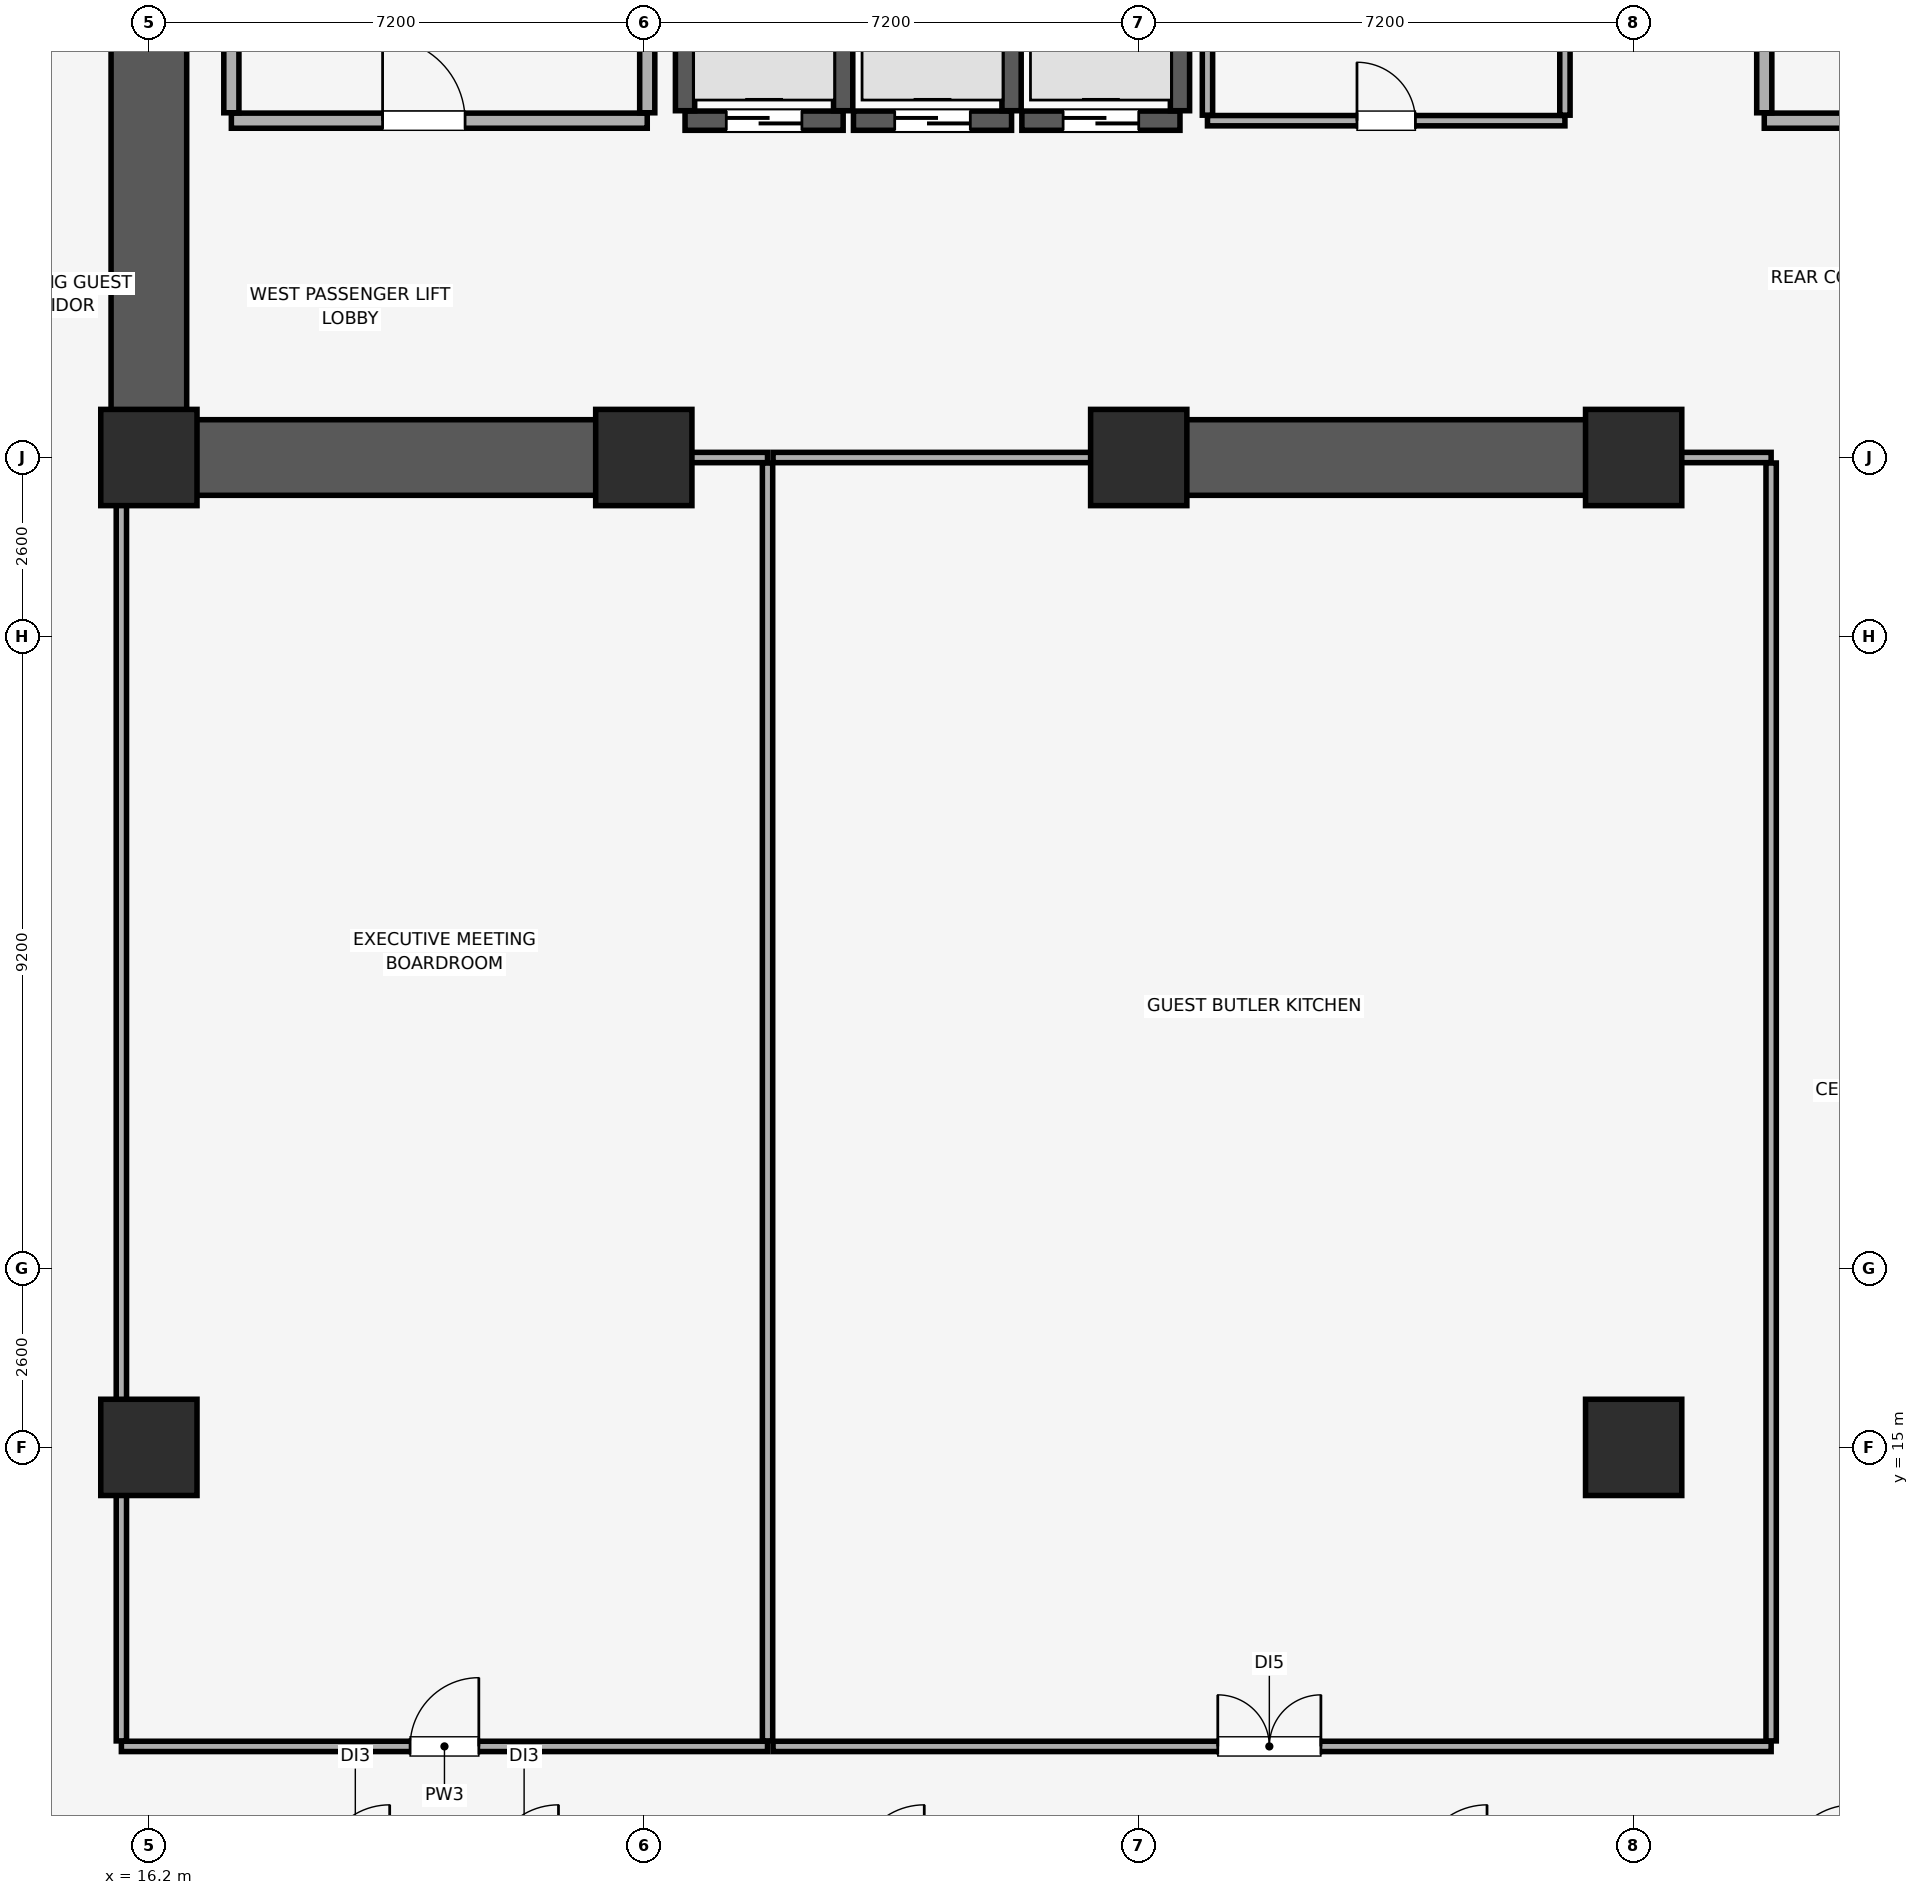
"""IFC4 building model, lengths in metres.
Left out: names, types, materials, properties, quantities, classifications, styles, units other than length and angle.
Written with IfcOpenShell. Run it as: python <this file> out.ifc"""

import sys

from ifc_helpers import new_model, si_unit, direction, frame, frame_2d, origin, origin_2d, place, context, subcontext, project, spatial, rectangle, extrude, element, fill, save


model = new_model("IFC4")
c1 = context("Model", 3, precision=1e-05, world=origin(), true_north=direction((0.0, 1.0)))
c2 = subcontext(c1, "Body", "Model", "MODEL_VIEW")
j1 = project(units=[si_unit("LENGTHUNIT", "METRE"), si_unit("PLANEANGLEUNIT", "RADIAN")], contexts=[c1])
p1 = place(None, origin())
s1 = spatial("IfcSite", under=j1, at=p1, CompositionType="ELEMENT")
p2 = place(p1, origin())
s2 = spatial("IfcBuilding", under=s1, at=p2, CompositionType="ELEMENT")
p3 = place(p2, frame((0.0, 0.0, 35.15)))
s3 = spatial("IfcBuildingStorey", under=s2, at=p3, CompositionType="ELEMENT", Elevation=35.15)
for number, where, z_axis, x_axis in (
    (1, (16.2, 15.0, 0.0), (0.0, 0.0, 1.0), (1.0, 0.0, 0.0)),
    (2, (37.8, 15.0, 0.0), (0.0, 0.0, 1.0), (1.0, 0.0, 0.0)),
    (3, (16.2, 29.4, 0.0), (0.0, 0.0, 1.0), (1.0, 0.0, 0.0)),
    (4, (23.4, 29.4, 0.0), (0.0, 0.0, 1.0), (1.0, 0.0, 0.0)),
    (5, (30.6, 29.4, 0.0), (0.0, 0.0, 1.0), (1.0, 0.0, 0.0)),
    (6, (37.8, 29.4, 0.0), (0.0, 0.0, 1.0), (1.0, 0.0, 0.0)),
):
    element("IfcColumn", number, at=place(p3, frame(where, z_axis=z_axis, x_axis=x_axis)), inside=s3, PredefinedType="COLUMN", context=c2, shape_type="SweptSolid", body=[
        extrude(rectangle(XDim=1.4, YDim=1.4, at=origin_2d()), origin(), (0.0, 0.0, 1.0), 3.51),
    ])
p4 = place(p3, frame((16.2, 29.4, 0.0), z_axis=(0.0, 0.0, 1.0), x_axis=(0.0, 1.0, 0.0)))
e7 = element("IfcWall", 7, at=p4, inside=s3, PredefinedType="SHEAR", context=c2, shape_type="SweptSolid", body=[
    extrude(rectangle(XDim=19.2, YDim=1.1, at=frame_2d((9.6, 0.0))), origin(), (0.0, 0.0, 1.0), 3.51),
])
p5 = place(p3, frame((16.755, 29.4, 0.0), z_axis=(0.0, 0.0, 1.0), x_axis=(1.0, 0.0, 0.0)))
e8 = element("IfcWall", 8, at=p5, inside=s3, PredefinedType="SHEAR", context=c2, shape_type="SweptSolid", body=[
    extrude(rectangle(XDim=6.845, YDim=1.1, at=frame_2d((3.423, 0.0))), origin(), (0.0, 0.0, 1.0), 3.51),
])
p6 = place(p3, frame((30.4, 29.4, 0.0), z_axis=(0.0, 0.0, 1.0), x_axis=(1.0, 0.0, 0.0)))
e9 = element("IfcWall", 9, at=p6, inside=s3, PredefinedType="SHEAR", context=c2, shape_type="SweptSolid", body=[
    extrude(rectangle(XDim=7.6, YDim=1.1, at=frame_2d((3.8, 0.0))), origin(), (0.0, 0.0, 1.0), 3.51),
])
p7 = place(p3, frame((24.0, 34.3, 0.0), z_axis=(0.0, 0.0, 1.0), x_axis=(1.0, 0.0, 0.0)))
e10 = element("IfcWall", 10, at=p7, inside=s3, PredefinedType="SHEAR", context=c2, shape_type="SweptSolid", body=[
    extrude(rectangle(XDim=2.3, YDim=0.28, at=frame_2d((1.15, 0.0))), origin(), (0.0, 0.0, 1.0), 3.51),
])
p8 = place(p7, frame((0.6, 0.0, 0.0)))
e11 = element("IfcOpeningElement", 11, at=p8, cuts=e10, PredefinedType="OPENING", context=c2, shape_type="SweptSolid", body=[
    extrude(rectangle(XDim=1.1, YDim=2.2, at=frame_2d((0.55, 1.1))), frame((0.0, 0.15, 0.0), z_axis=(0.0, -1.0, 0.0), x_axis=(1.0, 0.0, 0.0)), (0.0, 0.0, 1.0), 0.3),
])
for number, where, z_axis, x_axis in (
    (12, (24.0, 34.445, 0.0), (0.0, 0.0, 1.0), (0.0, 1.0, 0.0)),
    (13, (26.3, 34.445, 0.0), (0.0, 0.0, 1.0), (0.0, 1.0, 0.0)),
):
    element("IfcWall", number, at=place(p3, frame(where, z_axis=z_axis, x_axis=x_axis)), inside=s3, PredefinedType="SHEAR", context=c2, shape_type="SweptSolid", body=[
        extrude(rectangle(XDim=2.01, YDim=0.28, at=frame_2d((1.005, 0.0))), origin(), (0.0, 0.0, 1.0), 3.51),
    ])
p9 = place(p3, frame((26.45, 34.3, 0.0), z_axis=(0.0, 0.0, 1.0), x_axis=(1.0, 0.0, 0.0)))
e14 = element("IfcWall", 14, at=p9, inside=s3, PredefinedType="SHEAR", context=c2, shape_type="SweptSolid", body=[
    extrude(rectangle(XDim=2.3, YDim=0.28, at=frame_2d((1.15, 0.0))), origin(), (0.0, 0.0, 1.0), 3.51),
])
p10 = place(p9, frame((0.6, 0.0, 0.0)))
e15 = element("IfcOpeningElement", 15, at=p10, cuts=e14, PredefinedType="OPENING", context=c2, shape_type="SweptSolid", body=[
    extrude(rectangle(XDim=1.1, YDim=2.2, at=frame_2d((0.55, 1.1))), frame((0.0, 0.15, 0.0), z_axis=(0.0, -1.0, 0.0), x_axis=(1.0, 0.0, 0.0)), (0.0, 0.0, 1.0), 0.3),
])
p11 = place(p3, frame((28.75, 34.445, 0.0), z_axis=(0.0, 0.0, 1.0), x_axis=(0.0, 1.0, 0.0)))
e16 = element("IfcWall", 16, at=p11, inside=s3, PredefinedType="SHEAR", context=c2, shape_type="SweptSolid", body=[
    extrude(rectangle(XDim=2.01, YDim=0.28, at=frame_2d((1.005, 0.0))), origin(), (0.0, 0.0, 1.0), 3.51),
])
p12 = place(p3, frame((28.9, 34.3, 0.0), z_axis=(0.0, 0.0, 1.0), x_axis=(1.0, 0.0, 0.0)))
e17 = element("IfcWall", 17, at=p12, inside=s3, PredefinedType="SHEAR", context=c2, shape_type="SweptSolid", body=[
    extrude(rectangle(XDim=2.3, YDim=0.28, at=frame_2d((1.15, 0.0))), origin(), (0.0, 0.0, 1.0), 3.51),
])
p13 = place(p12, frame((0.6, 0.0, 0.0)))
e18 = element("IfcOpeningElement", 18, at=p13, cuts=e17, PredefinedType="OPENING", context=c2, shape_type="SweptSolid", body=[
    extrude(rectangle(XDim=1.1, YDim=2.2, at=frame_2d((0.55, 1.1))), frame((0.0, 0.15, 0.0), z_axis=(0.0, -1.0, 0.0), x_axis=(1.0, 0.0, 0.0)), (0.0, 0.0, 1.0), 0.3),
])
p14 = place(p3, frame((31.2, 34.445, 0.0), z_axis=(0.0, 0.0, 1.0), x_axis=(0.0, 1.0, 0.0)))
e19 = element("IfcWall", 19, at=p14, inside=s3, PredefinedType="SHEAR", context=c2, shape_type="SweptSolid", body=[
    extrude(rectangle(XDim=2.01, YDim=0.28, at=frame_2d((1.005, 0.0))), origin(), (0.0, 0.0, 1.0), 3.51),
])
p15 = place(p3, frame((17.4, 34.3, 0.0), z_axis=(0.0, 0.0, 1.0), x_axis=(1.0, 0.0, 0.0)))
e20 = element("IfcWall", 20, at=p15, inside=s3, PredefinedType="PARTITIONING", context=c2, shape_type="SweptSolid", body=[
    extrude(rectangle(XDim=6.05, YDim=0.22, at=frame_2d((3.025, 0.0))), origin(), (0.0, 0.0, 1.0), 3.51),
])
p16 = place(p15, frame((2.2, 0.0, 0.0)))
e21 = element("IfcOpeningElement", 21, at=p16, cuts=e20, PredefinedType="OPENING", context=c2, shape_type="SweptSolid", body=[
    extrude(rectangle(XDim=1.2, YDim=2.15, at=frame_2d((0.6, 1.075))), frame((0.0, 0.12, 0.0), z_axis=(0.0, -1.0, 0.0), x_axis=(1.0, 0.0, 0.0)), (0.0, 0.0, 1.0), 0.24),
])
p17 = place(p3, frame((17.4, 34.415, 0.0), z_axis=(0.0, 0.0, 1.0), x_axis=(0.0, 1.0, 0.0)))
e22 = element("IfcWall", 22, at=p17, inside=s3, PredefinedType="PARTITIONING", context=c2, shape_type="SweptSolid", body=[
    extrude(rectangle(XDim=5.43, YDim=0.22, at=frame_2d((2.715, 0.0))), origin(), (0.0, 0.0, 1.0), 3.51),
])
p18 = place(p3, frame((23.45, 34.415, 0.0), z_axis=(0.0, 0.0, 1.0), x_axis=(0.0, 1.0, 0.0)))
e23 = element("IfcWall", 23, at=p18, inside=s3, PredefinedType="PARTITIONING", context=c2, shape_type="SweptSolid", body=[
    extrude(rectangle(XDim=5.64, YDim=0.22, at=frame_2d((2.82, 0.0))), origin(), (0.0, 0.0, 1.0), 3.51),
])
p19 = place(p3, frame((39.7, 34.3, 0.0), z_axis=(0.0, 0.0, 1.0), x_axis=(1.0, 0.0, 0.0)))
e24 = element("IfcWall", 24, at=p19, inside=s3, PredefinedType="PARTITIONING", context=c2, shape_type="SweptSolid", body=[
    extrude(rectangle(XDim=4.6, YDim=0.22, at=frame_2d((2.3, 0.0))), origin(), (0.0, 0.0, 1.0), 3.51),
])
p20 = place(p19, frame((1.7, 0.0, 0.0)))
e25 = element("IfcOpeningElement", 25, at=p20, cuts=e24, PredefinedType="OPENING", context=c2, shape_type="SweptSolid", body=[
    extrude(rectangle(XDim=1.2, YDim=2.15, at=frame_2d((0.6, 1.075))), frame((0.0, 0.12, 0.0), z_axis=(0.0, -1.0, 0.0), x_axis=(1.0, 0.0, 0.0)), (0.0, 0.0, 1.0), 0.24),
])
p21 = place(p3, frame((39.7, 34.415, 0.0), z_axis=(0.0, 0.0, 1.0), x_axis=(0.0, 1.0, 0.0)))
e26 = element("IfcWall", 26, at=p21, inside=s3, PredefinedType="PARTITIONING", context=c2, shape_type="SweptSolid", body=[
    extrude(rectangle(XDim=5.785, YDim=0.22, at=frame_2d((2.893, 0.0))), origin(), (0.0, 0.0, 1.0), 3.51),
])
p22 = place(p3, frame((31.6, 34.3, 0.0), z_axis=(0.0, 0.0, 1.0), x_axis=(1.0, 0.0, 0.0)))
e27 = element("IfcWall", 27, at=p22, inside=s3, PredefinedType="PARTITIONING", context=c2, shape_type="SweptSolid", body=[
    extrude(rectangle(XDim=5.2, YDim=0.15, at=frame_2d((2.6, 0.0))), origin(), (0.0, 0.0, 1.0), 3.51),
])
p23 = place(p22, frame((2.175, 0.0, 0.0)))
e28 = element("IfcOpeningElement", 28, at=p23, cuts=e27, PredefinedType="OPENING", context=c2, shape_type="SweptSolid", body=[
    extrude(rectangle(XDim=0.85, YDim=2.1, at=frame_2d((0.425, 1.05))), frame((0.0, 0.085, 0.0), z_axis=(0.0, -1.0, 0.0), x_axis=(1.0, 0.0, 0.0)), (0.0, 0.0, 1.0), 0.17),
])
for number, where, z_axis, x_axis in (
    (29, (31.6, 34.38, 0.0), (0.0, 0.0, 1.0), (0.0, 1.0, 0.0)),
    (30, (36.8, 34.38, 0.0), (0.0, 0.0, 1.0), (0.0, 1.0, 0.0)),
):
    element("IfcWall", number, at=place(p3, frame(where, z_axis=z_axis, x_axis=x_axis)), inside=s3, PredefinedType="PARTITIONING", context=c2, shape_type="SweptSolid", body=[
        extrude(rectangle(XDim=4.94, YDim=0.15, at=frame_2d((2.47, 0.0))), origin(), (0.0, 0.0, 1.0), 3.51),
    ])
p24 = place(p3, frame((15.8, 10.65, 0.0), z_axis=(0.0, 0.0, 1.0), x_axis=(1.0, 0.0, 0.0)))
e31 = element("IfcWall", 31, at=p24, inside=s3, PredefinedType="PARTITIONING", context=c2, shape_type="SweptSolid", body=[
    extrude(rectangle(XDim=9.4, YDim=0.15, at=frame_2d((4.7, 0.0))), origin(), (0.0, 0.0, 1.0), 3.51),
])
p25 = place(p24, frame((4.2, 0.0, 0.0)))
e32 = element("IfcOpeningElement", 32, at=p25, cuts=e31, PredefinedType="OPENING", context=c2, shape_type="SweptSolid", body=[
    extrude(rectangle(XDim=1.0, YDim=2.15, at=frame_2d((0.5, 1.075))), frame((0.0, 0.085, 0.0), z_axis=(0.0, -1.0, 0.0), x_axis=(1.0, 0.0, 0.0)), (0.0, 0.0, 1.0), 0.17),
])
p26 = place(p3, frame((23.61, 29.4, 0.0), z_axis=(0.0, 0.0, 1.0), x_axis=(1.0, 0.0, 0.0)))
e33 = element("IfcWall", 33, at=p26, inside=s3, PredefinedType="PARTITIONING", context=c2, shape_type="SweptSolid", body=[
    extrude(rectangle(XDim=1.59, YDim=0.15, at=frame_2d((0.795, 0.0))), origin(), (0.0, 0.0, 1.0), 2.41),
])
p27 = place(p3, frame((15.8, 10.73, 0.0), z_axis=(0.0, 0.0, 1.0), x_axis=(0.0, 1.0, 0.0)))
e34 = element("IfcWall", 34, at=p27, inside=s3, PredefinedType="PARTITIONING", context=c2, shape_type="SweptSolid", body=[
    extrude(rectangle(XDim=18.66, YDim=0.15, at=frame_2d((9.33, 0.0))), origin(), (0.0, 0.0, 1.0), 3.51),
])
p28 = place(p3, frame((25.2, 10.73, 0.0), z_axis=(0.0, 0.0, 1.0), x_axis=(0.0, 1.0, 0.0)))
e35 = element("IfcWall", 35, at=p28, inside=s3, PredefinedType="PARTITIONING", context=c2, shape_type="SweptSolid", body=[
    extrude(rectangle(XDim=18.59, YDim=0.15, at=frame_2d((9.295, 0.0))), origin(), (0.0, 0.0, 1.0), 3.51),
])
p29 = place(p3, frame((25.28, 10.65, 0.0), z_axis=(0.0, 0.0, 1.0), x_axis=(1.0, 0.0, 0.0)))
e36 = element("IfcWall", 36, at=p29, inside=s3, PredefinedType="PARTITIONING", context=c2, shape_type="SweptSolid", body=[
    extrude(rectangle(XDim=14.52, YDim=0.15, at=frame_2d((7.26, 0.0))), origin(), (0.0, 0.0, 1.0), 3.51),
])
p30 = place(p29, frame((6.47, 0.0, 0.0)))
e37 = element("IfcOpeningElement", 37, at=p30, cuts=e36, PredefinedType="OPENING", context=c2, shape_type="SweptSolid", body=[
    extrude(rectangle(XDim=1.5, YDim=2.25, at=frame_2d((0.75, 1.125))), frame((0.0, 0.085, 0.0), z_axis=(0.0, -1.0, 0.0), x_axis=(1.0, 0.0, 0.0)), (0.0, 0.0, 1.0), 0.17),
])
p31 = place(p3, frame((25.28, 29.4, 0.0), z_axis=(0.0, 0.0, 1.0), x_axis=(1.0, 0.0, 0.0)))
e38 = element("IfcWall", 38, at=p31, inside=s3, PredefinedType="PARTITIONING", context=c2, shape_type="SweptSolid", body=[
    extrude(rectangle(XDim=5.11, YDim=0.15, at=frame_2d((2.555, 0.0))), origin(), (0.0, 0.0, 1.0), 2.41),
])
p32 = place(p3, frame((38.01, 29.4, 0.0), z_axis=(0.0, 0.0, 1.0), x_axis=(1.0, 0.0, 0.0)))
e39 = element("IfcWall", 39, at=p32, inside=s3, PredefinedType="PARTITIONING", context=c2, shape_type="SweptSolid", body=[
    extrude(rectangle(XDim=1.79, YDim=0.15, at=frame_2d((0.895, 0.0))), origin(), (0.0, 0.0, 1.0), 2.41),
])
p33 = place(p3, frame((39.8, 10.73, 0.0), z_axis=(0.0, 0.0, 1.0), x_axis=(0.0, 1.0, 0.0)))
e40 = element("IfcWall", 40, at=p33, inside=s3, PredefinedType="PARTITIONING", context=c2, shape_type="SweptSolid", body=[
    extrude(rectangle(XDim=18.59, YDim=0.15, at=frame_2d((9.295, 0.0))), origin(), (0.0, 0.0, 1.0), 3.51),
])
p34 = place(p8, origin())
e41 = element("IfcDoor", 41, at=p34, inside=s3, OperationType="DOUBLE_DOOR_SLIDING", PredefinedType="DOOR", context=c2, shape_type="SweptSolid", body=[
    extrude(rectangle(XDim=1.1, YDim=2.2, at=frame_2d((0.55, 1.1))), frame((0.0, 0.025, 0.0), z_axis=(0.0, -1.0, 0.0), x_axis=(1.0, 0.0, 0.0)), (0.0, 0.0, 1.0), 0.05),
])
fill(e11, e41)
p35 = place(p10, origin())
e42 = element("IfcDoor", 42, at=p35, inside=s3, OperationType="DOUBLE_DOOR_SLIDING", PredefinedType="DOOR", context=c2, shape_type="SweptSolid", body=[
    extrude(rectangle(XDim=1.1, YDim=2.2, at=frame_2d((0.55, 1.1))), frame((0.0, 0.025, 0.0), z_axis=(0.0, -1.0, 0.0), x_axis=(1.0, 0.0, 0.0)), (0.0, 0.0, 1.0), 0.05),
])
fill(e15, e42)
p36 = place(p13, origin())
e43 = element("IfcDoor", 43, at=p36, inside=s3, OperationType="DOUBLE_DOOR_SLIDING", PredefinedType="DOOR", context=c2, shape_type="SweptSolid", body=[
    extrude(rectangle(XDim=1.1, YDim=2.2, at=frame_2d((0.55, 1.1))), frame((0.0, 0.025, 0.0), z_axis=(0.0, -1.0, 0.0), x_axis=(1.0, 0.0, 0.0)), (0.0, 0.0, 1.0), 0.05),
])
fill(e18, e43)
p37 = place(p16, origin())
e44 = element("IfcDoor", 44, at=p37, inside=s3, OperationType="SINGLE_SWING_LEFT", PredefinedType="DOOR", context=c2, shape_type="SweptSolid", body=[
    extrude(rectangle(XDim=1.2, YDim=2.15, at=frame_2d((0.6, 1.075))), frame((0.0, 0.025, 0.0), z_axis=(0.0, -1.0, 0.0), x_axis=(1.0, 0.0, 0.0)), (0.0, 0.0, 1.0), 0.05),
])
fill(e21, e44)
p38 = place(p23, origin())
e45 = element("IfcDoor", 45, at=p38, inside=s3, OperationType="SINGLE_SWING_LEFT", PredefinedType="DOOR", context=c2, shape_type="SweptSolid", body=[
    extrude(rectangle(XDim=0.85, YDim=2.1, at=frame_2d((0.425, 1.05))), frame((0.0, 0.025, 0.0), z_axis=(0.0, -1.0, 0.0), x_axis=(1.0, 0.0, 0.0)), (0.0, 0.0, 1.0), 0.05),
])
fill(e28, e45)
p39 = place(p25, origin())
e46 = element("IfcDoor", 46, at=p39, inside=s3, OperationType="SINGLE_SWING_RIGHT", PredefinedType="DOOR", context=c2, shape_type="SweptSolid", body=[
    extrude(rectangle(XDim=1.0, YDim=2.15, at=frame_2d((0.5, 1.075))), frame((0.0, 0.025, 0.0), z_axis=(0.0, -1.0, 0.0), x_axis=(1.0, 0.0, 0.0)), (0.0, 0.0, 1.0), 0.05),
])
fill(e32, e46)
p40 = place(p30, origin())
e47 = element("IfcDoor", 47, at=p40, inside=s3, OperationType="DOUBLE_DOOR_SINGLE_SWING", PredefinedType="DOOR", context=c2, shape_type="SweptSolid", body=[
    extrude(rectangle(XDim=1.5, YDim=2.25, at=frame_2d((0.75, 1.125))), frame((0.0, 0.025, 0.0), z_axis=(0.0, -1.0, 0.0), x_axis=(1.0, 0.0, 0.0)), (0.0, 0.0, 1.0), 0.05),
])
fill(e37, e47)
save(model, sys.argv[1])
